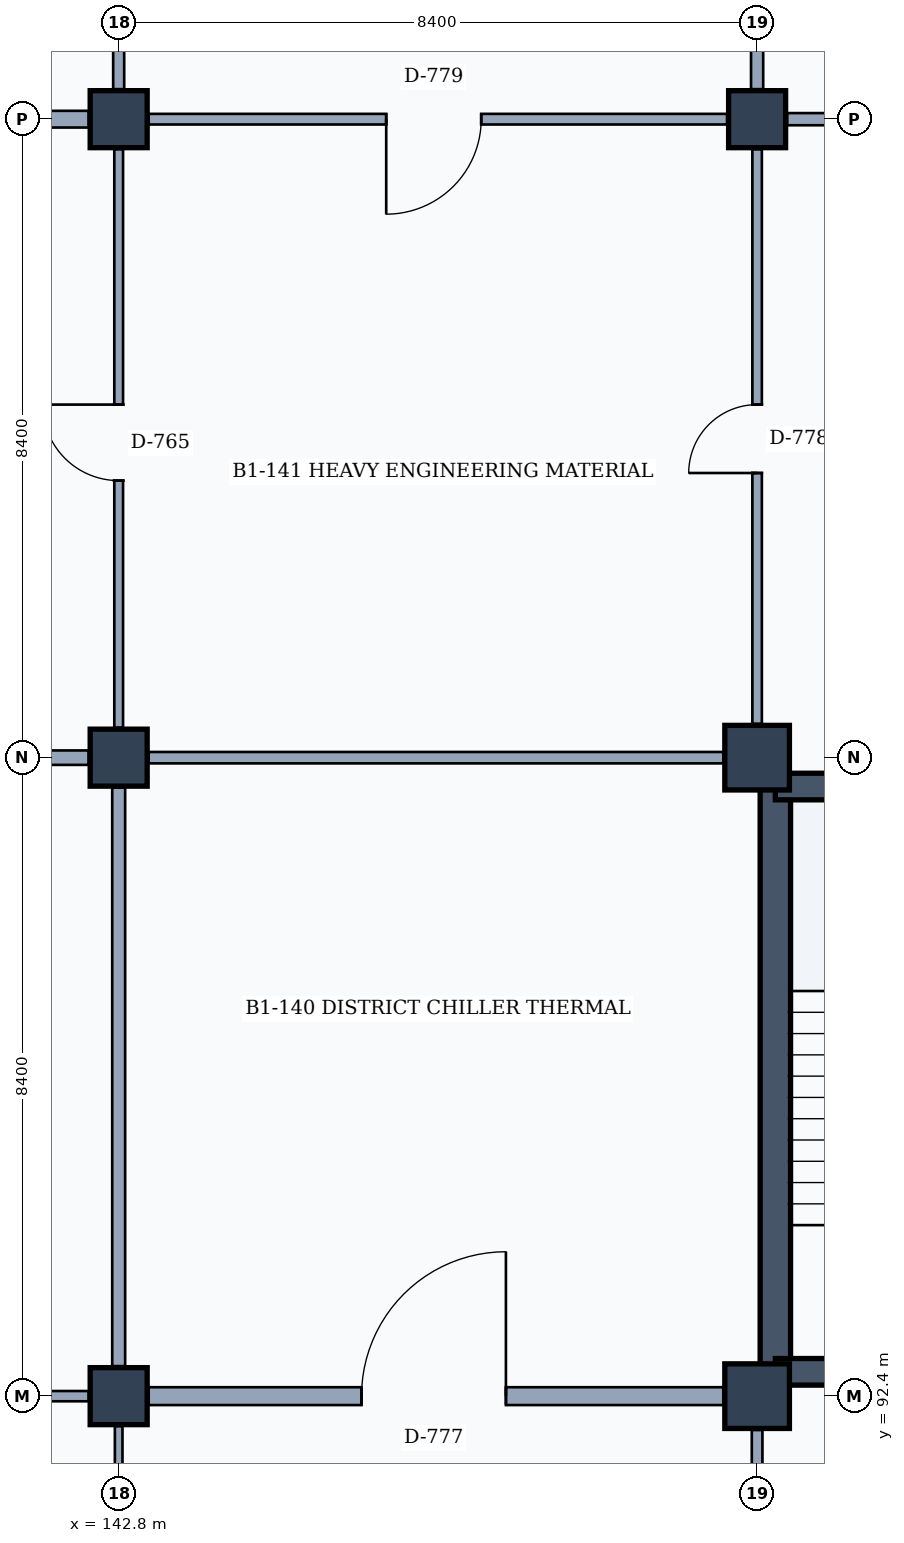
"""IFC4 building model, lengths in metres.
Left out: names, types, materials, properties, quantities, classifications, styles, units other than length and angle.
Written with IfcOpenShell. Run it as: python <this file> out.ifc"""

import sys

from ifc_helpers import new_model, si_unit, direction, frame, frame_2d, origin, origin_2d, place, context, subcontext, project, spatial, rectangle, extrude, element, fill, save


model = new_model("IFC4")
c1 = context("Model", 3, precision=1e-05, world=origin(), true_north=direction((0.0, 1.0)))
c2 = subcontext(c1, "Body", "Model", "MODEL_VIEW")
j1 = project(units=[si_unit("LENGTHUNIT", "METRE"), si_unit("PLANEANGLEUNIT", "RADIAN")], contexts=[c1])
p1 = place(None, origin())
s1 = spatial("IfcSite", under=j1, at=p1, CompositionType="ELEMENT")
p2 = place(p1, origin())
s2 = spatial("IfcBuilding", under=s1, at=p2, CompositionType="ELEMENT")
p3 = place(p2, frame((0.0, 0.0, -4.2)))
s3 = spatial("IfcBuildingStorey", under=s2, at=p3, CompositionType="ELEMENT", Elevation=-4.2)
for number, where, z_axis, x_axis in (
    (1, (142.8, 92.4, 0.0), (0.0, 0.0, 1.0), (1.0, 0.0, 0.0)),
    (2, (142.8, 100.8, 0.0), (0.0, 0.0, 1.0), (1.0, 0.0, 0.0)),
    (3, (142.8, 109.2, 0.0), (0.0, 0.0, 1.0), (1.0, 0.0, 0.0)),
):
    element("IfcColumn", number, at=place(p3, frame(where, z_axis=z_axis, x_axis=x_axis)), inside=s3, PredefinedType="COLUMN", context=c2, shape_type="SweptSolid", body=[
        extrude(rectangle(XDim=0.75, YDim=0.75, at=origin_2d()), origin(), (0.0, 0.0, 1.0), 4.2),
    ])
for number, where, z_axis, x_axis in (
    (4, (151.2, 92.4, 0.0), (0.0, 0.0, 1.0), (1.0, 0.0, 0.0)),
    (5, (151.2, 100.8, 0.0), (0.0, 0.0, 1.0), (1.0, 0.0, 0.0)),
):
    element("IfcColumn", number, at=place(p3, frame(where, z_axis=z_axis, x_axis=x_axis)), inside=s3, PredefinedType="COLUMN", context=c2, shape_type="SweptSolid", body=[
        extrude(rectangle(XDim=0.85, YDim=0.85, at=origin_2d()), origin(), (0.0, 0.0, 1.0), 4.2),
    ])
p4 = place(p3, frame((151.2, 109.2, 0.0), z_axis=(0.0, 0.0, 1.0), x_axis=(1.0, 0.0, 0.0)))
e6 = element("IfcColumn", 6, at=p4, inside=s3, PredefinedType="COLUMN", context=c2, shape_type="SweptSolid", body=[
    extrude(rectangle(XDim=0.75, YDim=0.75, at=origin_2d()), origin(), (0.0, 0.0, 1.0), 4.2),
])
p5 = place(p3, frame((151.44, 92.65, 0.0), z_axis=(0.0, 0.0, 1.0), x_axis=(0.0, 1.0, 0.0)))
e7 = element("IfcWall", 7, at=p5, inside=s3, PredefinedType="SHEAR", context=c2, shape_type="SweptSolid", body=[
    extrude(rectangle(XDim=7.94, YDim=0.4, at=frame_2d((3.97, 0.0))), origin(), (0.0, 0.0, 1.0), 3.9),
])
for number, where, z_axis, x_axis in (
    (8, (151.44, 100.42, 0.0), (0.0, 0.0, 1.0), (1.0, 0.0, 0.0)),
    (9, (159.34, 92.72, 0.0), (0.0, 0.0, 1.0), (-1.0, 0.0, 0.0)),
):
    element("IfcWall", number, at=place(p3, frame(where, z_axis=z_axis, x_axis=x_axis)), inside=s3, PredefinedType="SHEAR", context=c2, shape_type="SweptSolid", body=[
        extrude(rectangle(XDim=7.9, YDim=0.35, at=frame_2d((3.95, 0.0))), origin(), (0.0, 0.0, 1.0), 3.9),
    ])
p6 = place(p3, frame((142.8, 84.395, 0.0), z_axis=(0.0, 0.0, 1.0), x_axis=(0.0, 1.0, 0.0)))
e10 = element("IfcWall", 10, at=p6, inside=s3, PredefinedType="MOVABLE", context=c2, shape_type="SweptSolid", body=[
    extrude(rectangle(XDim=7.61, YDim=0.1, at=frame_2d((3.805, 0.0))), origin(), (0.0, 0.0, 1.0), 3.1),
])
p7 = place(p3, frame((134.745, 92.4, 0.0), z_axis=(0.0, 0.0, 1.0), x_axis=(1.0, 0.0, 0.0)))
e11 = element("IfcWall", 11, at=p7, inside=s3, PredefinedType="PARTITIONING", context=c2, shape_type="SweptSolid", body=[
    extrude(rectangle(XDim=7.66, YDim=0.135, at=frame_2d((3.83, 0.0))), origin(), (0.0, 0.0, 1.0), 3.03),
])
p8 = place(p7, frame((3.025, 0.0, 0.0)))
e12 = element("IfcOpeningElement", 12, at=p8, cuts=e11, PredefinedType="OPENING", context=c2, shape_type="SweptSolid", body=[
    extrude(rectangle(XDim=1.45, YDim=2.35, at=frame_2d((0.725, 1.175))), frame((0.0, 0.077, 0.0), z_axis=(0.0, -1.0, 0.0), x_axis=(1.0, 0.0, 0.0)), (0.0, 0.0, 1.0), 0.155),
])
p9 = place(p3, frame((142.8, 92.795, 0.0), z_axis=(0.0, 0.0, 1.0), x_axis=(0.0, 1.0, 0.0)))
e13 = element("IfcWall", 13, at=p9, inside=s3, PredefinedType="PARTITIONING", context=c2, shape_type="SweptSolid", body=[
    extrude(rectangle(XDim=7.61, YDim=0.17, at=frame_2d((3.805, 0.0))), origin(), (0.0, 0.0, 1.0), 3.1),
])
p10 = place(p3, frame((134.745, 100.8, 0.0), z_axis=(0.0, 0.0, 1.0), x_axis=(1.0, 0.0, 0.0)))
e14 = element("IfcWall", 14, at=p10, inside=s3, PredefinedType="PARTITIONING", context=c2, shape_type="SweptSolid", body=[
    extrude(rectangle(XDim=7.66, YDim=0.19, at=frame_2d((3.83, 0.0))), origin(), (0.0, 0.0, 1.0), 3.03),
])
p11 = place(p3, frame((142.8, 101.195, 0.0), z_axis=(0.0, 0.0, 1.0), x_axis=(0.0, 1.0, 0.0)))
e15 = element("IfcWall", 15, at=p11, inside=s3, PredefinedType="PARTITIONING", context=c2, shape_type="SweptSolid", body=[
    extrude(rectangle(XDim=7.61, YDim=0.115, at=frame_2d((3.805, 0.0))), origin(), (0.0, 0.0, 1.0), 3.1),
])
p12 = place(p11, frame((3.25, 0.0, 0.0)))
e16 = element("IfcOpeningElement", 16, at=p12, cuts=e15, PredefinedType="OPENING", context=c2, shape_type="SweptSolid", body=[
    extrude(rectangle(XDim=1.0, YDim=2.15, at=frame_2d((0.5, 1.075))), frame((0.0, 0.067, 0.0), z_axis=(0.0, -1.0, 0.0), x_axis=(1.0, 0.0, 0.0)), (0.0, 0.0, 1.0), 0.135),
])
p13 = place(p3, frame((134.745, 109.2, 0.0), z_axis=(0.0, 0.0, 1.0), x_axis=(1.0, 0.0, 0.0)))
e17 = element("IfcWall", 17, at=p13, inside=s3, PredefinedType="PARTITIONING", context=c2, shape_type="SweptSolid", body=[
    extrude(rectangle(XDim=7.66, YDim=0.22, at=frame_2d((3.83, 0.0))), origin(), (0.0, 0.0, 1.0), 3.03),
])
p14 = place(p13, frame((3.275, 0.0, 0.0)))
e18 = element("IfcOpeningElement", 18, at=p14, cuts=e17, PredefinedType="OPENING", context=c2, shape_type="SweptSolid", body=[
    extrude(rectangle(XDim=0.95, YDim=2.15, at=frame_2d((0.475, 1.075))), frame((0.0, 0.12, 0.0), z_axis=(0.0, -1.0, 0.0), x_axis=(1.0, 0.0, 0.0)), (0.0, 0.0, 1.0), 0.24),
])
p15 = place(p3, frame((142.8, 109.595, 0.0), z_axis=(0.0, 0.0, 1.0), x_axis=(0.0, 1.0, 0.0)))
e19 = element("IfcWall", 19, at=p15, inside=s3, PredefinedType="PARTITIONING", context=c2, shape_type="SweptSolid", body=[
    extrude(rectangle(XDim=7.61, YDim=0.145, at=frame_2d((3.805, 0.0))), origin(), (0.0, 0.0, 1.0), 3.1),
])
p16 = place(p3, frame((151.2, 84.395, 0.0), z_axis=(0.0, 0.0, 1.0), x_axis=(0.0, 1.0, 0.0)))
e20 = element("IfcWall", 20, at=p16, inside=s3, PredefinedType="PARTITIONING", context=c2, shape_type="SweptSolid", body=[
    extrude(rectangle(XDim=7.56, YDim=0.14, at=frame_2d((3.78, 0.0))), origin(), (0.0, 0.0, 1.0), 3.1),
])
p17 = place(p3, frame((143.195, 92.4, 0.0), z_axis=(0.0, 0.0, 1.0), x_axis=(1.0, 0.0, 0.0)))
e21 = element("IfcWall", 21, at=p17, inside=s3, PredefinedType="PARTITIONING", context=c2, shape_type="SweptSolid", body=[
    extrude(rectangle(XDim=7.56, YDim=0.235, at=frame_2d((3.78, 0.0))), origin(), (0.0, 0.0, 1.0), 3.05),
])
p18 = place(p17, frame((2.8, 0.0, 0.0)))
e22 = element("IfcOpeningElement", 22, at=p18, cuts=e21, PredefinedType="OPENING", context=c2, shape_type="SweptSolid", body=[
    extrude(rectangle(XDim=1.9, YDim=2.4, at=frame_2d((0.95, 1.2))), frame((0.0, 0.127, 0.0), z_axis=(0.0, -1.0, 0.0), x_axis=(1.0, 0.0, 0.0)), (0.0, 0.0, 1.0), 0.255),
])
p19 = place(p3, frame((143.195, 100.8, 0.0), z_axis=(0.0, 0.0, 1.0), x_axis=(1.0, 0.0, 0.0)))
e23 = element("IfcWall", 23, at=p19, inside=s3, PredefinedType="PARTITIONING", context=c2, shape_type="SweptSolid", body=[
    extrude(rectangle(XDim=7.56, YDim=0.15, at=frame_2d((3.78, 0.0))), origin(), (0.0, 0.0, 1.0), 3.05),
])
p20 = place(p3, frame((151.2, 101.245, 0.0), z_axis=(0.0, 0.0, 1.0), x_axis=(0.0, 1.0, 0.0)))
e24 = element("IfcWall", 24, at=p20, inside=s3, PredefinedType="PARTITIONING", context=c2, shape_type="SweptSolid", body=[
    extrude(rectangle(XDim=7.56, YDim=0.125, at=frame_2d((3.78, 0.0))), origin(), (0.0, 0.0, 1.0), 3.1),
])
p21 = place(p20, frame((3.3, 0.0, 0.0)))
e25 = element("IfcOpeningElement", 25, at=p21, cuts=e24, PredefinedType="OPENING", context=c2, shape_type="SweptSolid", body=[
    extrude(rectangle(XDim=0.9, YDim=2.1, at=frame_2d((0.45, 1.05))), frame((0.0, 0.073, 0.0), z_axis=(0.0, -1.0, 0.0), x_axis=(1.0, 0.0, 0.0)), (0.0, 0.0, 1.0), 0.145),
])
p22 = place(p3, frame((143.195, 109.2, 0.0), z_axis=(0.0, 0.0, 1.0), x_axis=(1.0, 0.0, 0.0)))
e26 = element("IfcWall", 26, at=p22, inside=s3, PredefinedType="PARTITIONING", context=c2, shape_type="SweptSolid", body=[
    extrude(rectangle(XDim=7.61, YDim=0.14, at=frame_2d((3.805, 0.0))), origin(), (0.0, 0.0, 1.0), 3.05),
])
p23 = place(p22, frame((3.125, 0.0, 0.0)))
e27 = element("IfcOpeningElement", 27, at=p23, cuts=e26, PredefinedType="OPENING", context=c2, shape_type="SweptSolid", body=[
    extrude(rectangle(XDim=1.25, YDim=2.3, at=frame_2d((0.625, 1.15))), frame((0.0, 0.08, 0.0), z_axis=(0.0, -1.0, 0.0), x_axis=(1.0, 0.0, 0.0)), (0.0, 0.0, 1.0), 0.16),
])
p24 = place(p3, frame((151.2, 109.595, 0.0), z_axis=(0.0, 0.0, 1.0), x_axis=(0.0, 1.0, 0.0)))
e28 = element("IfcWall", 28, at=p24, inside=s3, PredefinedType="PARTITIONING", context=c2, shape_type="SweptSolid", body=[
    extrude(rectangle(XDim=7.61, YDim=0.16, at=frame_2d((3.805, 0.0))), origin(), (0.0, 0.0, 1.0), 3.1),
])
p25 = place(p3, frame((151.595, 109.2, 0.0), z_axis=(0.0, 0.0, 1.0), x_axis=(1.0, 0.0, 0.0)))
e29 = element("IfcWall", 29, at=p25, inside=s3, PredefinedType="PARTITIONING", context=c2, shape_type="SweptSolid", body=[
    extrude(rectangle(XDim=7.61, YDim=0.16, at=frame_2d((3.805, 0.0))), origin(), (0.0, 0.0, 1.0), 3.05),
])
p26 = place(p25, frame((3.225, 0.0, 0.0)))
e30 = element("IfcOpeningElement", 30, at=p26, cuts=e29, PredefinedType="OPENING", context=c2, shape_type="SweptSolid", body=[
    extrude(rectangle(XDim=1.05, YDim=2.2, at=frame_2d((0.525, 1.1))), frame((0.0, 0.09, 0.0), z_axis=(0.0, -1.0, 0.0), x_axis=(1.0, 0.0, 0.0)), (0.0, 0.0, 1.0), 0.18),
])
p27 = place(p12, origin())
e31 = element("IfcDoor", 31, at=p27, inside=s3, OperationType="SINGLE_SWING_RIGHT", PredefinedType="DOOR", context=c2, shape_type="SweptSolid", body=[
    extrude(rectangle(XDim=1.0, YDim=2.15, at=frame_2d((0.5, 1.075))), frame((0.0, 0.025, 0.0), z_axis=(0.0, -1.0, 0.0), x_axis=(1.0, 0.0, 0.0)), (0.0, 0.0, 1.0), 0.05),
])
fill(e16, e31)
p28 = place(p18, origin())
e32 = element("IfcDoor", 32, at=p28, inside=s3, OperationType="SINGLE_SWING_RIGHT", PredefinedType="DOOR", context=c2, shape_type="SweptSolid", body=[
    extrude(rectangle(XDim=1.9, YDim=2.4, at=frame_2d((0.95, 1.2))), frame((0.0, 0.025, 0.0), z_axis=(0.0, -1.0, 0.0), x_axis=(1.0, 0.0, 0.0)), (0.0, 0.0, 1.0), 0.05),
])
fill(e22, e32)
p29 = place(p21, origin())
e33 = element("IfcDoor", 33, at=p29, inside=s3, OperationType="SINGLE_SWING_LEFT", PredefinedType="DOOR", context=c2, shape_type="SweptSolid", body=[
    extrude(rectangle(XDim=0.9, YDim=2.1, at=frame_2d((0.45, 1.05))), frame((0.0, 0.025, 0.0), z_axis=(0.0, -1.0, 0.0), x_axis=(1.0, 0.0, 0.0)), (0.0, 0.0, 1.0), 0.05),
])
fill(e25, e33)
p30 = place(p23, frame((1.25, 0.0, 0.0), z_axis=(0.0, 0.0, 1.0), x_axis=(-1.0, 0.0, 0.0)))
e34 = element("IfcDoor", 34, at=p30, inside=s3, OperationType="SINGLE_SWING_RIGHT", PredefinedType="DOOR", context=c2, shape_type="SweptSolid", body=[
    extrude(rectangle(XDim=1.25, YDim=2.3, at=frame_2d((0.625, 1.15))), frame((0.0, 0.025, 0.0), z_axis=(0.0, -1.0, 0.0), x_axis=(1.0, 0.0, 0.0)), (0.0, 0.0, 1.0), 0.05),
])
fill(e27, e34)
save(model, sys.argv[1])
